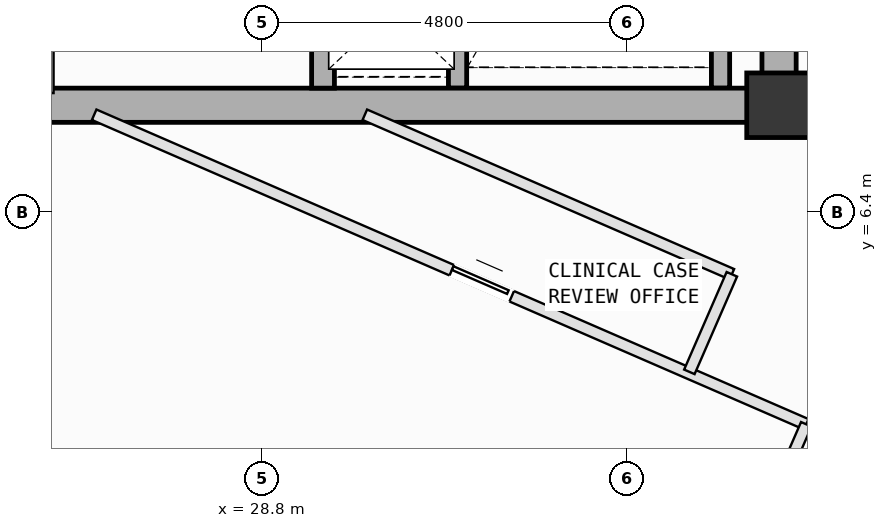
"""IFC4 building model, lengths in metres.
Left out: names, types, materials, properties, quantities, classifications, styles, units other than length and angle.
Written with IfcOpenShell. Run it as: python <this file> out.ifc"""

import sys

from ifc_helpers import new_model, si_unit, direction, frame, frame_2d, origin, origin_2d, place, context, subcontext, project, spatial, rectangle, extrude, element, fill, save


model = new_model("IFC4")
c1 = context("Model", 3, precision=1e-05, world=origin(), true_north=direction((0.0, 1.0)))
c2 = subcontext(c1, "Body", "Model", "MODEL_VIEW")
j1 = project(units=[si_unit("LENGTHUNIT", "METRE"), si_unit("PLANEANGLEUNIT", "RADIAN")], contexts=[c1])
p1 = place(None, origin())
s1 = spatial("IfcSite", under=j1, at=p1, CompositionType="ELEMENT")
p2 = place(p1, origin())
s2 = spatial("IfcBuilding", under=s1, at=p2, CompositionType="ELEMENT")
p3 = place(p2, frame((0.0, 0.0, 312.6)))
s3 = spatial("IfcBuildingStorey", under=s2, at=p3, CompositionType="ELEMENT", Elevation=312.6)
p4 = place(p3, frame((35.6, 7.8, 0.0), z_axis=(0.0, 0.0, 1.0), x_axis=(1.0, 0.0, 0.0)))
e1 = element("IfcColumn", 1, at=p4, inside=s3, PredefinedType="COLUMN", context=c2, shape_type="SweptSolid", body=[
    extrude(rectangle(XDim=0.85, YDim=0.85, at=origin_2d()), origin(), (0.0, 0.0, 1.0), 4.0),
])
for number, where, z_axis, x_axis in (
    (2, (34.83, 15.12, 0.0), (0.0, 0.0, 1.0), (0.0, -1.0, 0.0)),
    (3, (31.37, 8.025, 0.0), (0.0, 0.0, 1.0), (0.0, 1.0, 0.0)),
):
    element("IfcWall", number, at=place(p3, frame(where, z_axis=z_axis, x_axis=x_axis)), inside=s3, PredefinedType="SOLIDWALL", context=c2, shape_type="SweptSolid", body=[
        extrude(rectangle(XDim=7.095, YDim=0.24, at=frame_2d((3.548, 0.0))), origin(), (0.0, 0.0, 1.0), 3.78),
    ])
p5 = place(p3, frame((24.8, 7.8, 0.0), z_axis=(0.0, 0.0, 1.0), x_axis=(1.0, 0.0, 0.0)))
e4 = element("IfcWall", 4, at=p5, inside=s3, PredefinedType="SHEAR", context=c2, shape_type="SweptSolid", body=[
    extrude(rectangle(XDim=10.8, YDim=0.45, at=frame_2d((5.4, 0.0))), origin(), (0.0, 0.0, 1.0), 3.78),
])
p6 = place(p3, frame((35.6, 7.8, 0.0), z_axis=(0.0, 0.0, 1.0), x_axis=(0.0, 1.0, 0.0)))
e5 = element("IfcWall", 5, at=p6, inside=s3, PredefinedType="SHEAR", context=c2, shape_type="SweptSolid", body=[
    extrude(rectangle(XDim=9.0, YDim=0.45, at=frame_2d((4.5, 0.0))), origin(), (0.0, 0.0, 1.0), 3.78),
])
p7 = place(p3, frame((29.6, 8.025, 0.0), z_axis=(0.0, 0.0, 1.0), x_axis=(0.0, 1.0, 0.0)))
e6 = element("IfcWall", 6, at=p7, inside=s3, PredefinedType="SOLIDWALL", context=c2, shape_type="SweptSolid", body=[
    extrude(rectangle(XDim=1.995, YDim=0.3, at=frame_2d((0.998, 0.0))), origin(), (0.0, 0.0, 1.0), 3.78),
])
p8 = place(p3, frame((25.98, 7.96, 0.0), z_axis=(0.0, 0.0, 1.0), x_axis=(0.0, 1.0, 0.0)))
e7 = element("IfcWall", 7, at=p8, inside=s3, PredefinedType="PARTITIONING", context=c2, shape_type="SweptSolid", body=[
    extrude(rectangle(XDim=4.04, YDim=0.15, at=frame_2d((2.02, 0.0))), origin(), (0.0, 0.0, 1.0), 3.78),
])
p9 = place(p8, frame((1.695, 0.0, 0.0)))
e8 = element("IfcOpeningElement", 8, at=p9, cuts=e7, PredefinedType="OPENING", context=c2, shape_type="SweptSolid", body=[
    extrude(rectangle(XDim=1.0, YDim=2.12, at=frame_2d((0.5, 1.06))), frame((0.0, 0.085, 0.0), z_axis=(0.0, -1.0, 0.0), x_axis=(1.0, 0.0, 0.0)), (0.0, 0.0, 1.0), 0.17),
])
p10 = place(p3, frame((33.286, -4.26, 0.0), z_axis=(0.0, 0.0, 1.0), x_axis=(0.398794571869, 0.9170402878, 0.0)))
e9 = element("IfcWall", 9, at=p10, inside=s3, PredefinedType="PARTITIONING", context=c2, shape_type="SweptSolid", body=[
    extrude(rectangle(XDim=13.04, YDim=0.15, at=frame_2d((6.52, 0.0))), origin(), (0.0, 0.0, 1.0), 2.765),
])
p11 = place(p3, frame((26.589, 7.675, 0.0), z_axis=(0.0, 0.0, 1.0), x_axis=(0.917085632944, -0.398690283112, 0.0)))
e10 = element("IfcWall", 10, at=p11, inside=s3, PredefinedType="PARTITIONING", context=c2, shape_type="SweptSolid", body=[
    extrude(rectangle(XDim=10.216, YDim=0.15, at=frame_2d((5.108, 0.0))), origin(), (0.0, 0.0, 1.0), 3.78),
])
p12 = place(p11, frame((5.131, 0.0, 0.0)))
e11 = element("IfcOpeningElement", 11, at=p12, cuts=e10, PredefinedType="OPENING", context=c2, shape_type="SweptSolid", body=[
    extrude(rectangle(XDim=0.86, YDim=2.06, at=frame_2d((0.43, 1.03))), frame((0.0, 0.085, 0.0), z_axis=(0.0, -1.0, 0.0), x_axis=(1.0, 0.0, 0.0)), (0.0, 0.0, 1.0), 0.17),
])
p13 = place(p3, frame((35.958, 3.602, 0.0), z_axis=(0.0, 0.0, 1.0), x_axis=(-0.398756424957, -0.917056875857, 0.0)))
e12 = element("IfcWall", 12, at=p13, inside=s3, PredefinedType="PARTITIONING", context=c2, shape_type="SweptSolid", body=[
    extrude(rectangle(XDim=8.835, YDim=0.15, at=frame_2d((4.417, 0.0))), origin(), (0.0, 0.0, 1.0), 2.765),
])
p14 = place(p3, frame((30.15, 7.675, 0.0), z_axis=(0.0, 0.0, 1.0), x_axis=(0.917103960726, -0.398648122059, 0.0)))
e13 = element("IfcWall", 13, at=p14, inside=s3, PredefinedType="PARTITIONING", context=c2, shape_type="SweptSolid", body=[
    extrude(rectangle(XDim=5.266, YDim=0.15, at=frame_2d((2.633, 0.0))), origin(), (0.0, 0.0, 1.0), 3.78),
])
p15 = place(p3, frame((34.979, 5.576, 0.0), z_axis=(0.0, 0.0, 1.0), x_axis=(-0.399236039494, -0.916848179782, 0.0)))
e14 = element("IfcWall", 14, at=p15, inside=s3, PredefinedType="PARTITIONING", context=c2, shape_type="SweptSolid", body=[
    extrude(rectangle(XDim=1.4, YDim=0.15, at=frame_2d((0.7, 0.0))), origin(), (0.0, 0.0, 1.0), 3.78),
])
p16 = place(p12, origin())
e15 = element("IfcDoor", 15, at=p16, inside=s3, OperationType="SLIDING_TO_LEFT", PredefinedType="DOOR", context=c2, shape_type="SweptSolid", body=[
    extrude(rectangle(XDim=0.86, YDim=2.06, at=frame_2d((0.43, 1.03))), frame((0.0, 0.025, 0.0), z_axis=(0.0, -1.0, 0.0), x_axis=(1.0, 0.0, 0.0)), (0.0, 0.0, 1.0), 0.05),
])
fill(e11, e15)
save(model, sys.argv[1])
